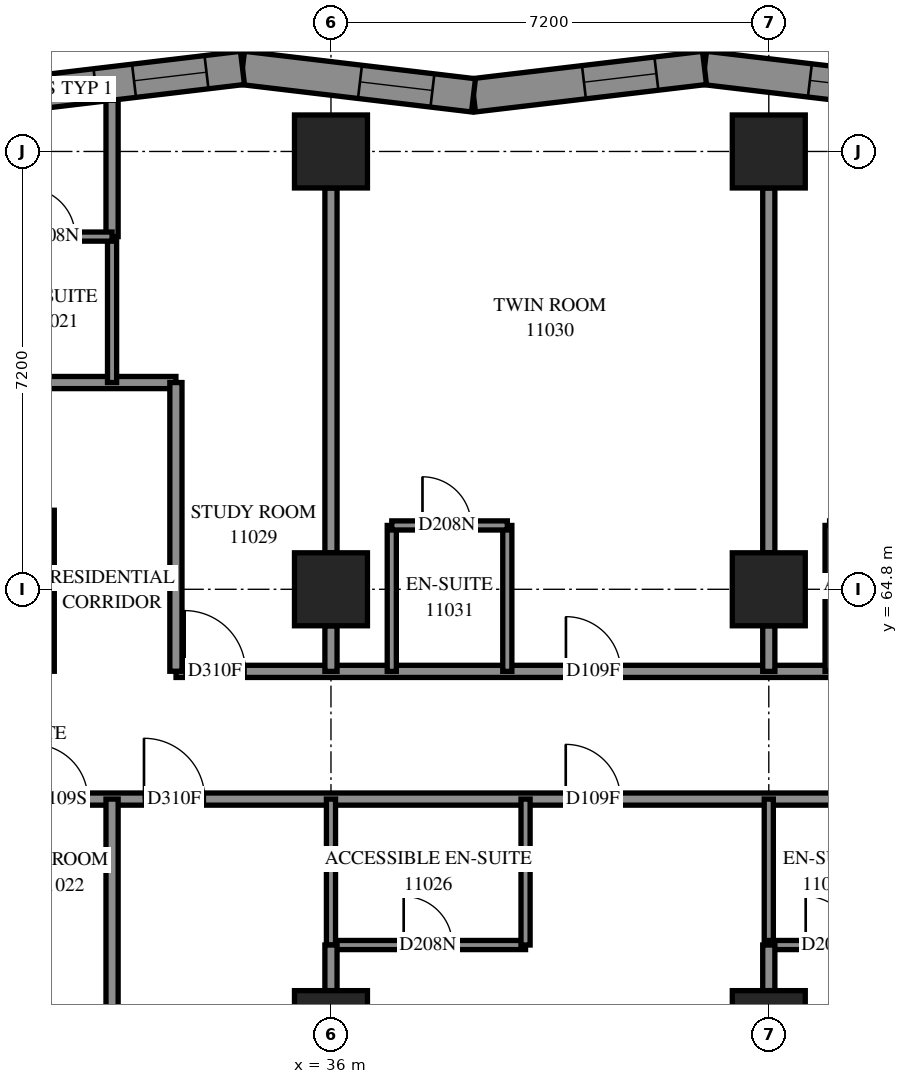
"""IFC4 building model, lengths in metres.
Left out: names, types, materials, properties, quantities, classifications, styles, units other than length and angle.
Written with IfcOpenShell. Run it as: python <this file> out.ifc"""

import sys

from ifc_helpers import new_model, si_unit, direction, frame, frame_2d, origin, origin_2d, place, context, subcontext, project, spatial, polyline, rectangle, outline, extrude, element, fill, save


model = new_model("IFC4")
c1 = context("Model", 3, precision=1e-05, world=origin(), true_north=direction((0.0, 1.0)))
c2 = subcontext(c1, "Body", "Model", "MODEL_VIEW")
j1 = project(units=[si_unit("LENGTHUNIT", "METRE"), si_unit("PLANEANGLEUNIT", "RADIAN")], contexts=[c1])
p1 = place(None, origin())
s1 = spatial("IfcSite", under=j1, at=p1, CompositionType="ELEMENT")
p2 = place(p1, origin())
s2 = spatial("IfcBuilding", under=s1, at=p2, CompositionType="ELEMENT")
p3 = place(p2, frame((0.0, 0.0, 44.0)))
s3 = spatial("IfcBuildingStorey", under=s2, at=p3, CompositionType="ELEMENT", Elevation=44.0)
for number, where, z_axis, x_axis in (
    (1, (36.0, 57.6, 0.0), (0.0, 0.0, 1.0), (1.0, 0.0, 0.0)),
    (2, (36.0, 64.8, 0.0), (0.0, 0.0, 1.0), (1.0, 0.0, 0.0)),
    (3, (36.0, 72.0, 0.0), (0.0, 0.0, 1.0), (1.0, 0.0, 0.0)),
    (4, (43.2, 57.6, 0.0), (0.0, 0.0, 1.0), (1.0, 0.0, 0.0)),
    (5, (43.2, 64.8, 0.0), (0.0, 0.0, 1.0), (1.0, 0.0, 0.0)),
    (6, (43.2, 72.0, 0.0), (0.0, 0.0, 1.0), (1.0, 0.0, 0.0)),
):
    element("IfcColumn", number, at=place(p3, frame(where, z_axis=z_axis, x_axis=x_axis)), inside=s3, PredefinedType="COLUMN", context=c2, shape_type="SweptSolid", body=[
        extrude(rectangle(XDim=1.2, YDim=1.2, at=origin_2d()), origin(), (0.0, 0.0, 1.0), 3.1),
    ])
p4 = place(p3, frame((45.942, 72.923, 0.0), z_axis=(0.0, 0.0, 1.0), x_axis=(-0.9930269402, 0.1178876415, 0.0)))
e7 = element("IfcWall", 7, at=p4, inside=s3, PredefinedType="SOLIDWALL", context=c2, shape_type="SweptSolid", body=[
    extrude(outline(polyline([(0.033, -0.275), (3.858, -0.275), (3.793, 0.275), (-0.033, 0.275), (0.033, -0.275)])), origin(), (0.0, 0.0, 1.0), 3.1),
])
p5 = place(p4, frame((0.88, 0.0, 0.5)))
e8 = element("IfcOpeningElement", 8, at=p5, cuts=e7, PredefinedType="OPENING", context=c2, shape_type="SweptSolid", body=[
    extrude(rectangle(XDim=1.2, YDim=2.45, at=frame_2d((0.6, 1.225))), frame((0.0, 0.285, 0.0), z_axis=(0.0, -1.0, 0.0), x_axis=(1.0, 0.0, 0.0)), (0.0, 0.0, 1.0), 0.57),
])
p6 = place(p3, frame((42.143, 73.374, 0.0), z_axis=(0.0, 0.0, 1.0), x_axis=(-0.9930269402, -0.1178876415, 0.0)))
e9 = element("IfcWall", 9, at=p6, inside=s3, PredefinedType="SOLIDWALL", context=c2, shape_type="SweptSolid", body=[
    extrude(outline(polyline([(-0.033, -0.275), (3.793, -0.275), (3.858, 0.275), (0.033, 0.275), (-0.033, -0.275)])), origin(), (0.0, 0.0, 1.0), 3.1),
])
p7 = place(p6, frame((0.797, 0.0, 0.5)))
e10 = element("IfcOpeningElement", 10, at=p7, cuts=e9, PredefinedType="OPENING", context=c2, shape_type="SweptSolid", body=[
    extrude(rectangle(XDim=1.2, YDim=2.45, at=frame_2d((0.6, 1.225))), frame((0.0, 0.285, 0.0), z_axis=(0.0, -1.0, 0.0), x_axis=(1.0, 0.0, 0.0)), (0.0, 0.0, 1.0), 0.57),
])
p8 = place(p3, frame((38.344, 72.923, 0.0), z_axis=(0.0, 0.0, 1.0), x_axis=(-0.9930265769, 0.1178907016, 0.0)))
e11 = element("IfcWall", 11, at=p8, inside=s3, PredefinedType="SOLIDWALL", context=c2, shape_type="SweptSolid", body=[
    extrude(outline(polyline([(0.033, -0.275), (3.858, -0.275), (3.793, 0.275), (-0.033, 0.275), (0.033, -0.275)])), origin(), (0.0, 0.0, 1.0), 3.1),
])
p9 = place(p8, frame((0.68, 0.0, 0.5)))
e12 = element("IfcOpeningElement", 12, at=p9, cuts=e11, PredefinedType="OPENING", context=c2, shape_type="SweptSolid", body=[
    extrude(rectangle(XDim=1.2, YDim=2.45, at=frame_2d((0.6, 1.225))), frame((0.0, 0.285, 0.0), z_axis=(0.0, -1.0, 0.0), x_axis=(1.0, 0.0, 0.0)), (0.0, 0.0, 1.0), 0.57),
])
p10 = place(p3, frame((34.545, 73.374, 0.0), z_axis=(0.0, 0.0, 1.0), x_axis=(-0.9930269402, -0.1178876415, 0.0)))
e13 = element("IfcWall", 13, at=p10, inside=s3, PredefinedType="SOLIDWALL", context=c2, shape_type="SweptSolid", body=[
    extrude(outline(polyline([(-0.033, -0.275), (3.793, -0.275), (3.858, 0.275), (0.033, 0.275), (-0.033, -0.275)])), origin(), (0.0, 0.0, 1.0), 3.1),
])
p11 = place(p10, frame((0.596, 0.0, 0.5)))
e14 = element("IfcOpeningElement", 14, at=p11, cuts=e13, PredefinedType="OPENING", context=c2, shape_type="SweptSolid", body=[
    extrude(rectangle(XDim=1.2, YDim=2.45, at=frame_2d((0.6, 1.225))), frame((0.0, 0.285, 0.0), z_axis=(0.0, -1.0, 0.0), x_axis=(1.0, 0.0, 0.0)), (0.0, 0.0, 1.0), 0.57),
])
p12 = place(p10, frame((2.434, 0.0, 0.45)))
e15 = element("IfcOpeningElement", 15, at=p12, cuts=e13, PredefinedType="OPENING", context=c2, shape_type="SweptSolid", body=[
    extrude(rectangle(XDim=1.0, YDim=2.5, at=frame_2d((0.5, 1.25))), frame((0.0, 0.285, 0.0), z_axis=(0.0, -1.0, 0.0), x_axis=(1.0, 0.0, 0.0)), (0.0, 0.0, 1.0), 0.57),
])
p13 = place(p3, frame((28.8, 61.35, 0.0), z_axis=(0.0, 0.0, 1.0), x_axis=(1.0, 0.0, 0.0)))
e16 = element("IfcWall", 16, at=p13, inside=s3, PredefinedType="PARTITIONING", context=c2, shape_type="SweptSolid", body=[
    extrude(rectangle(XDim=24.15, YDim=0.2, at=frame_2d((12.075, 0.0))), origin(), (0.0, 0.0, 1.0), 3.1),
])
p14 = place(p13, frame((2.3, 0.0, 0.0)))
e17 = element("IfcOpeningElement", 17, at=p14, cuts=e16, PredefinedType="OPENING", context=c2, shape_type="SweptSolid", body=[
    extrude(rectangle(XDim=0.9, YDim=2.1, at=frame_2d((0.45, 1.05))), frame((0.0, 0.11, 0.0), z_axis=(0.0, -1.0, 0.0), x_axis=(1.0, 0.0, 0.0)), (0.0, 0.0, 1.0), 0.22),
])
p15 = place(p13, frame((4.125, 0.0, 0.0)))
e18 = element("IfcOpeningElement", 18, at=p15, cuts=e16, PredefinedType="OPENING", context=c2, shape_type="SweptSolid", body=[
    extrude(rectangle(XDim=1.0, YDim=2.1, at=frame_2d((0.5, 1.05))), frame((0.0, 0.11, 0.0), z_axis=(0.0, -1.0, 0.0), x_axis=(1.0, 0.0, 0.0)), (0.0, 0.0, 1.0), 0.22),
])
p16 = place(p13, frame((11.061, 0.0, 0.0)))
e19 = element("IfcOpeningElement", 19, at=p16, cuts=e16, PredefinedType="OPENING", context=c2, shape_type="SweptSolid", body=[
    extrude(rectangle(XDim=0.9, YDim=2.1, at=frame_2d((0.45, 1.05))), frame((0.0, 0.11, 0.0), z_axis=(0.0, -1.0, 0.0), x_axis=(1.0, 0.0, 0.0)), (0.0, 0.0, 1.0), 0.22),
])
p17 = place(p13, frame((16.7, 0.0, 0.0)))
e20 = element("IfcOpeningElement", 20, at=p17, cuts=e16, PredefinedType="OPENING", context=c2, shape_type="SweptSolid", body=[
    extrude(rectangle(XDim=0.9, YDim=2.1, at=frame_2d((0.45, 1.05))), frame((0.0, 0.11, 0.0), z_axis=(0.0, -1.0, 0.0), x_axis=(1.0, 0.0, 0.0)), (0.0, 0.0, 1.0), 0.22),
])
p18 = place(p13, frame((18.508, 0.0, 0.0)))
e21 = element("IfcOpeningElement", 21, at=p18, cuts=e16, PredefinedType="OPENING", context=c2, shape_type="SweptSolid", body=[
    extrude(rectangle(XDim=1.0, YDim=2.1, at=frame_2d((0.5, 1.05))), frame((0.0, 0.11, 0.0), z_axis=(0.0, -1.0, 0.0), x_axis=(1.0, 0.0, 0.0)), (0.0, 0.0, 1.0), 0.22),
])
p19 = place(p13, frame((22.882, 0.0, 0.0)))
e22 = element("IfcOpeningElement", 22, at=p19, cuts=e16, PredefinedType="OPENING", context=c2, shape_type="SweptSolid", body=[
    extrude(rectangle(XDim=1.0, YDim=2.1, at=frame_2d((0.5, 1.05))), frame((0.0, 0.11, 0.0), z_axis=(0.0, -1.0, 0.0), x_axis=(1.0, 0.0, 0.0)), (0.0, 0.0, 1.0), 0.22),
])
p20 = place(p3, frame((33.452, 63.45, 0.0), z_axis=(0.0, 0.0, 1.0), x_axis=(1.0, 0.0, 0.0)))
e23 = element("IfcWall", 23, at=p20, inside=s3, PredefinedType="PARTITIONING", context=c2, shape_type="SweptSolid", body=[
    extrude(rectangle(XDim=21.648, YDim=0.2, at=frame_2d((10.824, 0.0))), origin(), (0.0, 0.0, 1.0), 3.1),
])
p21 = place(p20, frame((0.142, 0.0, 0.0)))
e24 = element("IfcOpeningElement", 24, at=p21, cuts=e23, PredefinedType="OPENING", context=c2, shape_type="SweptSolid", body=[
    extrude(rectangle(XDim=1.0, YDim=2.1, at=frame_2d((0.5, 1.05))), frame((0.0, 0.11, 0.0), z_axis=(0.0, -1.0, 0.0), x_axis=(1.0, 0.0, 0.0)), (0.0, 0.0, 1.0), 0.22),
])
p22 = place(p20, frame((6.412, 0.0, 0.0)))
e25 = element("IfcOpeningElement", 25, at=p22, cuts=e23, PredefinedType="OPENING", context=c2, shape_type="SweptSolid", body=[
    extrude(rectangle(XDim=0.9, YDim=2.1, at=frame_2d((0.45, 1.05))), frame((0.0, 0.11, 0.0), z_axis=(0.0, -1.0, 0.0), x_axis=(1.0, 0.0, 0.0)), (0.0, 0.0, 1.0), 0.22),
])
p23 = place(p20, frame((14.168, 0.0, 0.0)))
e26 = element("IfcOpeningElement", 26, at=p23, cuts=e23, PredefinedType="OPENING", context=c2, shape_type="SweptSolid", body=[
    extrude(rectangle(XDim=0.9, YDim=2.1, at=frame_2d((0.45, 1.05))), frame((0.0, 0.11, 0.0), z_axis=(0.0, -1.0, 0.0), x_axis=(1.0, 0.0, 0.0)), (0.0, 0.0, 1.0), 0.22),
])
p24 = place(p20, frame((17.651, 0.0, 0.0)))
e27 = element("IfcOpeningElement", 27, at=p24, cuts=e23, PredefinedType="OPENING", context=c2, shape_type="SweptSolid", body=[
    extrude(rectangle(XDim=0.9, YDim=2.1, at=frame_2d((0.45, 1.05))), frame((0.0, 0.11, 0.0), z_axis=(0.0, -1.0, 0.0), x_axis=(1.0, 0.0, 0.0)), (0.0, 0.0, 1.0), 0.22),
])
p25 = place(p3, frame((21.602, 68.2, 0.0), z_axis=(0.0, 0.0, 1.0), x_axis=(1.0, 0.0, 0.0)))
e28 = element("IfcWall", 28, at=p25, inside=s3, PredefinedType="PARTITIONING", context=c2, shape_type="SweptSolid", body=[
    extrude(rectangle(XDim=11.848, YDim=0.2, at=frame_2d((5.924, 0.0))), origin(), (0.0, 0.0, 1.0), 3.1),
])
p26 = place(p25, frame((5.855, 0.0, 0.0)))
e29 = element("IfcOpeningElement", 29, at=p26, cuts=e28, PredefinedType="OPENING", context=c2, shape_type="SweptSolid", body=[
    extrude(rectangle(XDim=0.9, YDim=2.1, at=frame_2d((0.45, 1.05))), frame((0.0, 0.11, 0.0), z_axis=(0.0, -1.0, 0.0), x_axis=(1.0, 0.0, 0.0)), (0.0, 0.0, 1.0), 0.22),
])
for number, where, z_axis, x_axis in (
    (30, (36.0, 65.4, 0.0), (0.0, 0.0, 1.0), (0.0, 1.0, 0.0)),
    (31, (43.2, 65.4, 0.0), (0.0, 0.0, 1.0), (0.0, 1.0, 0.0)),
):
    element("IfcWall", number, at=place(p3, frame(where, z_axis=z_axis, x_axis=x_axis)), inside=s3, PredefinedType="PARTITIONING", context=c2, shape_type="SweptSolid", body=[
        extrude(rectangle(XDim=6.0, YDim=0.2, at=frame_2d((3.0, 0.0))), origin(), (0.0, 0.0, 1.0), 3.1),
    ])
p27 = place(p3, frame((33.45, 63.452, 0.0), z_axis=(0.0, 0.0, 1.0), x_axis=(0.0, 1.0, 0.0)))
e32 = element("IfcWall", 32, at=p27, inside=s3, PredefinedType="PARTITIONING", context=c2, shape_type="SweptSolid", body=[
    extrude(rectangle(XDim=4.748, YDim=0.2, at=frame_2d((2.374, 0.0))), origin(), (0.0, 0.0, 1.0), 3.1),
])
p28 = place(p3, frame((32.4, 56.95, 0.0), z_axis=(0.0, 0.0, 1.0), x_axis=(0.0, 1.0, 0.0)))
e33 = element("IfcWall", 33, at=p28, inside=s3, PredefinedType="PARTITIONING", context=c2, shape_type="SweptSolid", body=[
    extrude(rectangle(XDim=4.4, YDim=0.2, at=frame_2d((2.2, 0.0))), origin(), (0.0, 0.0, 1.0), 3.1),
])
p29 = place(p3, frame((36.0, 58.95, 0.0), z_axis=(0.0, 0.0, 1.0), x_axis=(1.0, 0.0, 0.0)))
e34 = element("IfcWall", 34, at=p29, inside=s3, PredefinedType="PARTITIONING", context=c2, shape_type="SweptSolid", body=[
    extrude(rectangle(XDim=3.2, YDim=0.15, at=frame_2d((1.6, 0.0))), origin(), (0.0, 0.0, 1.0), 3.1),
])
p30 = place(p29, frame((1.196, 0.0, 0.0)))
e35 = element("IfcOpeningElement", 35, at=p30, cuts=e34, PredefinedType="OPENING", context=c2, shape_type="SweptSolid", body=[
    extrude(rectangle(XDim=0.8, YDim=2.1, at=frame_2d((0.4, 1.05))), frame((0.0, 0.085, 0.0), z_axis=(0.0, -1.0, 0.0), x_axis=(1.0, 0.0, 0.0)), (0.0, 0.0, 1.0), 0.17),
])
p31 = place(p3, frame((31.35, 63.452, 0.0), z_axis=(0.0, 0.0, 1.0), x_axis=(0.0, 1.0, 0.0)))
e36 = element("IfcWall", 36, at=p31, inside=s3, PredefinedType="PARTITIONING", context=c2, shape_type="SweptSolid", body=[
    extrude(rectangle(XDim=2.648, YDim=0.2, at=frame_2d((1.324, 0.0))), origin(), (0.0, 0.0, 1.0), 3.1),
])
for number, where, z_axis, x_axis in (
    (37, (39.2, 58.95, 0.0), (0.0, 0.0, 1.0), (0.0, 1.0, 0.0)),
    (38, (36.0, 58.95, 0.0), (0.0, 0.0, 1.0), (0.0, 1.0, 0.0)),
    (39, (43.2, 58.95, 0.0), (0.0, 0.0, 1.0), (0.0, 1.0, 0.0)),
    (40, (32.4, 68.2, 0.0), (0.0, 0.0, 1.0), (0.0, 1.0, 0.0)),
    (41, (37.0, 63.45, 0.0), (0.0, 0.0, 1.0), (0.0, 1.0, 0.0)),
    (42, (38.9, 63.45, 0.0), (0.0, 0.0, 1.0), (0.0, 1.0, 0.0)),
    (43, (44.2, 63.45, 0.0), (0.0, 0.0, 1.0), (0.0, 1.0, 0.0)),
):
    element("IfcWall", number, at=place(p3, frame(where, z_axis=z_axis, x_axis=x_axis)), inside=s3, PredefinedType="PARTITIONING", context=c2, shape_type="SweptSolid", body=[
        extrude(rectangle(XDim=2.4, YDim=0.15, at=frame_2d((1.2, 0.0))), origin(), (0.0, 0.0, 1.0), 3.1),
    ])
p32 = place(p3, frame((32.4, 70.6, 0.0), z_axis=(0.0, 0.0, 1.0), x_axis=(0.0, 1.0, 0.0)))
e44 = element("IfcWall", 44, at=p32, inside=s3, PredefinedType="PARTITIONING", context=c2, shape_type="SweptSolid", body=[
    extrude(rectangle(XDim=2.243, YDim=0.2, at=frame_2d((1.121, 0.0))), origin(), (0.0, 0.0, 1.0), 3.1),
])
p33 = place(p3, frame((43.2, 58.95, 0.0), z_axis=(0.0, 0.0, 1.0), x_axis=(1.0, 0.0, 0.0)))
e45 = element("IfcWall", 45, at=p33, inside=s3, PredefinedType="PARTITIONING", context=c2, shape_type="SweptSolid", body=[
    extrude(rectangle(XDim=1.9, YDim=0.15, at=frame_2d((0.95, 0.0))), origin(), (0.0, 0.0, 1.0), 3.1),
])
p34 = place(p33, frame((0.607, 0.0, 0.0)))
e46 = element("IfcOpeningElement", 46, at=p34, cuts=e45, PredefinedType="OPENING", context=c2, shape_type="SweptSolid", body=[
    extrude(rectangle(XDim=0.8, YDim=2.1, at=frame_2d((0.4, 1.05))), frame((0.0, 0.085, 0.0), z_axis=(0.0, -1.0, 0.0), x_axis=(1.0, 0.0, 0.0)), (0.0, 0.0, 1.0), 0.17),
])
p35 = place(p3, frame((30.5, 70.6, 0.0), z_axis=(0.0, 0.0, 1.0), x_axis=(1.0, 0.0, 0.0)))
e47 = element("IfcWall", 47, at=p35, inside=s3, PredefinedType="PARTITIONING", context=c2, shape_type="SweptSolid", body=[
    extrude(rectangle(XDim=1.9, YDim=0.15, at=frame_2d((0.95, 0.0))), origin(), (0.0, 0.0, 1.0), 3.1),
])
p36 = place(p35, frame((0.493, 0.0, 0.0)))
e48 = element("IfcOpeningElement", 48, at=p36, cuts=e47, PredefinedType="OPENING", context=c2, shape_type="SweptSolid", body=[
    extrude(rectangle(XDim=0.8, YDim=2.1, at=frame_2d((0.4, 1.05))), frame((0.0, 0.085, 0.0), z_axis=(0.0, -1.0, 0.0), x_axis=(1.0, 0.0, 0.0)), (0.0, 0.0, 1.0), 0.17),
])
p37 = place(p3, frame((37.0, 65.85, 0.0), z_axis=(0.0, 0.0, 1.0), x_axis=(1.0, 0.0, 0.0)))
e49 = element("IfcWall", 49, at=p37, inside=s3, PredefinedType="PARTITIONING", context=c2, shape_type="SweptSolid", body=[
    extrude(rectangle(XDim=1.9, YDim=0.15, at=frame_2d((0.95, 0.0))), origin(), (0.0, 0.0, 1.0), 3.1),
])
p38 = place(p37, frame((0.505, 0.0, 0.0)))
e50 = element("IfcOpeningElement", 50, at=p38, cuts=e49, PredefinedType="OPENING", context=c2, shape_type="SweptSolid", body=[
    extrude(rectangle(XDim=0.8, YDim=2.1, at=frame_2d((0.4, 1.05))), frame((0.0, 0.085, 0.0), z_axis=(0.0, -1.0, 0.0), x_axis=(1.0, 0.0, 0.0)), (0.0, 0.0, 1.0), 0.17),
])
for number, where, z_axis, x_axis in (
    (51, (36.0, 58.2, 0.0), (0.0, 0.0, 1.0), (0.0, 1.0, 0.0)),
    (52, (36.0, 63.45, 0.0), (0.0, 0.0, 1.0), (0.0, 1.0, 0.0)),
    (53, (43.2, 58.2, 0.0), (0.0, 0.0, 1.0), (0.0, 1.0, 0.0)),
    (54, (43.2, 63.45, 0.0), (0.0, 0.0, 1.0), (0.0, 1.0, 0.0)),
):
    element("IfcWall", number, at=place(p3, frame(where, z_axis=z_axis, x_axis=x_axis)), inside=s3, PredefinedType="PARTITIONING", context=c2, shape_type="SweptSolid", body=[
        extrude(rectangle(XDim=0.75, YDim=0.2, at=frame_2d((0.375, 0.0))), origin(), (0.0, 0.0, 1.0), 3.1),
    ])
p39 = place(p5, origin())
e55 = element("IfcWindow", 55, at=p39, inside=s3, PartitioningType="SINGLE_PANEL", PredefinedType="WINDOW", context=c2, shape_type="SweptSolid", body=[
    extrude(rectangle(XDim=1.2, YDim=2.45, at=frame_2d((0.6, 1.225))), frame((0.0, 0.155, 0.0), z_axis=(0.0, -1.0, 0.0), x_axis=(1.0, 0.0, 0.0)), (0.0, 0.0, 1.0), 0.06),
])
fill(e8, e55)
p40 = place(p7, origin())
e56 = element("IfcWindow", 56, at=p40, inside=s3, PartitioningType="SINGLE_PANEL", PredefinedType="WINDOW", context=c2, shape_type="SweptSolid", body=[
    extrude(rectangle(XDim=1.2, YDim=2.45, at=frame_2d((0.6, 1.225))), frame((0.0, 0.155, 0.0), z_axis=(0.0, -1.0, 0.0), x_axis=(1.0, 0.0, 0.0)), (0.0, 0.0, 1.0), 0.06),
])
fill(e10, e56)
p41 = place(p9, origin())
e57 = element("IfcWindow", 57, at=p41, inside=s3, PartitioningType="SINGLE_PANEL", PredefinedType="WINDOW", context=c2, shape_type="SweptSolid", body=[
    extrude(rectangle(XDim=1.2, YDim=2.45, at=frame_2d((0.6, 1.225))), frame((0.0, 0.155, 0.0), z_axis=(0.0, -1.0, 0.0), x_axis=(1.0, 0.0, 0.0)), (0.0, 0.0, 1.0), 0.06),
])
fill(e12, e57)
p42 = place(p11, origin())
e58 = element("IfcWindow", 58, at=p42, inside=s3, PartitioningType="SINGLE_PANEL", PredefinedType="WINDOW", context=c2, shape_type="SweptSolid", body=[
    extrude(rectangle(XDim=1.2, YDim=2.45, at=frame_2d((0.6, 1.225))), frame((0.0, 0.155, 0.0), z_axis=(0.0, -1.0, 0.0), x_axis=(1.0, 0.0, 0.0)), (0.0, 0.0, 1.0), 0.06),
])
fill(e14, e58)
p43 = place(p36, origin())
e59 = element("IfcDoor", 59, at=p43, inside=s3, OperationType="SINGLE_SWING_RIGHT", PredefinedType="DOOR", context=c2, shape_type="SweptSolid", body=[
    extrude(rectangle(XDim=0.8, YDim=2.1, at=frame_2d((0.4, 1.05))), frame((0.0, 0.025, 0.0), z_axis=(0.0, -1.0, 0.0), x_axis=(1.0, 0.0, 0.0)), (0.0, 0.0, 1.0), 0.05),
])
fill(e48, e59)
p44 = place(p14, origin())
e60 = element("IfcDoor", 60, at=p44, inside=s3, OperationType="SINGLE_SWING_LEFT", PredefinedType="DOOR", context=c2, shape_type="SweptSolid", body=[
    extrude(rectangle(XDim=0.9, YDim=2.1, at=frame_2d((0.45, 1.05))), frame((0.0, 0.025, 0.0), z_axis=(0.0, -1.0, 0.0), x_axis=(1.0, 0.0, 0.0)), (0.0, 0.0, 1.0), 0.05),
])
fill(e17, e60)
p45 = place(p15, origin())
e61 = element("IfcDoor", 61, at=p45, inside=s3, OperationType="SINGLE_SWING_RIGHT", PredefinedType="DOOR", context=c2, shape_type="SweptSolid", body=[
    extrude(rectangle(XDim=1.0, YDim=2.1, at=frame_2d((0.5, 1.05))), frame((0.0, 0.025, 0.0), z_axis=(0.0, -1.0, 0.0), x_axis=(1.0, 0.0, 0.0)), (0.0, 0.0, 1.0), 0.05),
])
fill(e18, e61)
p46 = place(p16, origin())
e62 = element("IfcDoor", 62, at=p46, inside=s3, OperationType="SINGLE_SWING_LEFT", PredefinedType="DOOR", context=c2, shape_type="SweptSolid", body=[
    extrude(rectangle(XDim=0.9, YDim=2.1, at=frame_2d((0.45, 1.05))), frame((0.0, 0.025, 0.0), z_axis=(0.0, -1.0, 0.0), x_axis=(1.0, 0.0, 0.0)), (0.0, 0.0, 1.0), 0.05),
])
fill(e19, e62)
p47 = place(p30, origin())
e63 = element("IfcDoor", 63, at=p47, inside=s3, OperationType="SINGLE_SWING_RIGHT", PredefinedType="DOOR", context=c2, shape_type="SweptSolid", body=[
    extrude(rectangle(XDim=0.8, YDim=2.1, at=frame_2d((0.4, 1.05))), frame((0.0, 0.025, 0.0), z_axis=(0.0, -1.0, 0.0), x_axis=(1.0, 0.0, 0.0)), (0.0, 0.0, 1.0), 0.05),
])
fill(e35, e63)
p48 = place(p34, origin())
e64 = element("IfcDoor", 64, at=p48, inside=s3, OperationType="SINGLE_SWING_RIGHT", PredefinedType="DOOR", context=c2, shape_type="SweptSolid", body=[
    extrude(rectangle(XDim=0.8, YDim=2.1, at=frame_2d((0.4, 1.05))), frame((0.0, 0.025, 0.0), z_axis=(0.0, -1.0, 0.0), x_axis=(1.0, 0.0, 0.0)), (0.0, 0.0, 1.0), 0.05),
])
fill(e46, e64)
p49 = place(p21, origin())
e65 = element("IfcDoor", 65, at=p49, inside=s3, OperationType="SINGLE_SWING_LEFT", PredefinedType="DOOR", context=c2, shape_type="SweptSolid", body=[
    extrude(rectangle(XDim=1.0, YDim=2.1, at=frame_2d((0.5, 1.05))), frame((0.0, 0.025, 0.0), z_axis=(0.0, -1.0, 0.0), x_axis=(1.0, 0.0, 0.0)), (0.0, 0.0, 1.0), 0.05),
])
fill(e24, e65)
p50 = place(p22, origin())
e66 = element("IfcDoor", 66, at=p50, inside=s3, OperationType="SINGLE_SWING_RIGHT", PredefinedType="DOOR", context=c2, shape_type="SweptSolid", body=[
    extrude(rectangle(XDim=0.9, YDim=2.1, at=frame_2d((0.45, 1.05))), frame((0.0, 0.025, 0.0), z_axis=(0.0, -1.0, 0.0), x_axis=(1.0, 0.0, 0.0)), (0.0, 0.0, 1.0), 0.05),
])
fill(e25, e66)
p51 = place(p38, origin())
e67 = element("IfcDoor", 67, at=p51, inside=s3, OperationType="SINGLE_SWING_RIGHT", PredefinedType="DOOR", context=c2, shape_type="SweptSolid", body=[
    extrude(rectangle(XDim=0.8, YDim=2.1, at=frame_2d((0.4, 1.05))), frame((0.0, 0.025, 0.0), z_axis=(0.0, -1.0, 0.0), x_axis=(1.0, 0.0, 0.0)), (0.0, 0.0, 1.0), 0.05),
])
fill(e50, e67)
p52 = place(p12, origin())
e68 = element("IfcWindow", 68, at=p52, inside=s3, PartitioningType="SINGLE_PANEL", PredefinedType="WINDOW", context=c2, shape_type="SweptSolid", body=[
    extrude(rectangle(XDim=1.0, YDim=2.5, at=frame_2d((0.5, 1.25))), frame((0.0, 0.155, 0.0), z_axis=(0.0, -1.0, 0.0), x_axis=(1.0, 0.0, 0.0)), (0.0, 0.0, 1.0), 0.06),
])
fill(e15, e68)
save(model, sys.argv[1])
